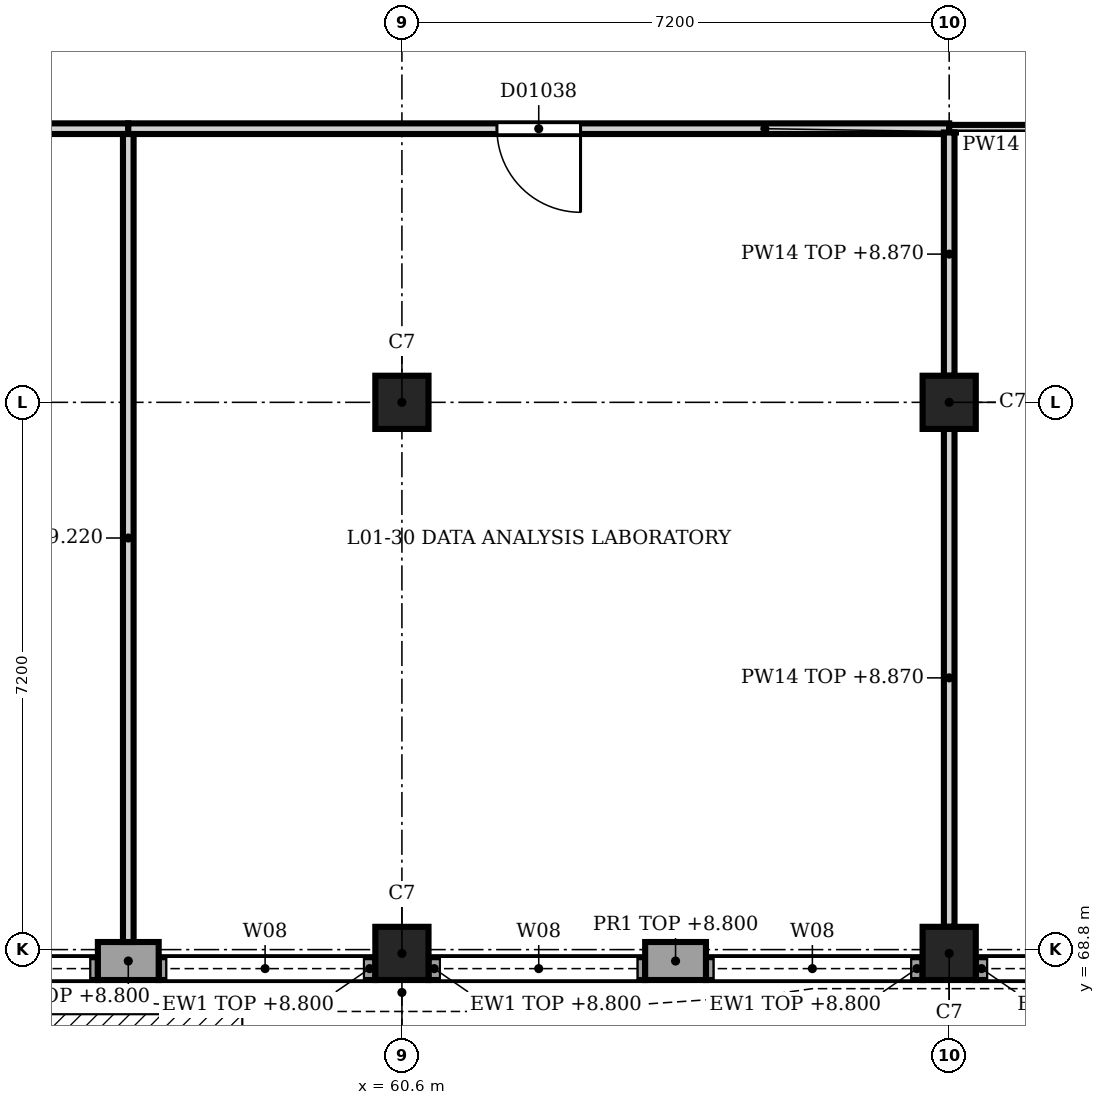
"""IFC4 building model, lengths in metres.
Left out: names, types, materials, properties, quantities, classifications, styles, units other than length and angle.
Written with IfcOpenShell. Run it as: python <this file> out.ifc"""

import sys

from ifc_helpers import new_model, si_unit, direction, frame, frame_2d, origin, origin_2d, place, context, subcontext, project, spatial, rectangle, extrude, element, fill, save


model = new_model("IFC4")
c1 = context("Model", 3, precision=1e-05, world=origin(), true_north=direction((0.0, 1.0)))
c2 = subcontext(c1, "Body", "Model", "MODEL_VIEW")
j1 = project(units=[si_unit("LENGTHUNIT", "METRE"), si_unit("PLANEANGLEUNIT", "RADIAN")], contexts=[c1])
p1 = place(None, origin())
s1 = spatial("IfcSite", under=j1, at=p1, CompositionType="ELEMENT")
p2 = place(p1, origin())
s2 = spatial("IfcBuilding", under=s1, at=p2, CompositionType="ELEMENT")
p3 = place(p2, frame((0.0, 0.0, 5.4)))
s3 = spatial("IfcBuildingStorey", under=s2, at=p3, CompositionType="ELEMENT", Elevation=5.4)
for number, where, z_axis, x_axis in (
    (1, (60.6, 68.75, 0.0), (0.0, 0.0, 1.0), (1.0, 0.0, 0.0)),
    (2, (60.6, 76.0, 0.0), (0.0, 0.0, 1.0), (1.0, 0.0, 0.0)),
    (3, (67.8, 68.75, 0.0), (0.0, 0.0, 1.0), (1.0, 0.0, 0.0)),
    (4, (67.8, 76.0, 0.0), (0.0, 0.0, 1.0), (1.0, 0.0, 0.0)),
):
    element("IfcColumn", number, at=place(p3, frame(where, z_axis=z_axis, x_axis=x_axis)), inside=s3, PredefinedType="COLUMN", context=c2, shape_type="SweptSolid", body=[
        extrude(rectangle(XDim=0.7, YDim=0.7, at=origin_2d()), origin(), (0.0, 0.0, 1.0), 4.5),
    ])
p4 = place(p3, frame((64.6, 68.65, 0.0), z_axis=(0.0, 0.0, 1.0), x_axis=(-1.0, 0.0, 0.0)))
e5 = element("IfcWall", 5, at=p4, inside=s3, PredefinedType="SOLIDWALL", context=c2, shape_type="SweptSolid", body=[
    extrude(rectangle(XDim=0.8, YDim=0.5, at=frame_2d((0.4, 0.0))), origin(), (0.0, 0.0, 1.0), 3.4),
])
p5 = place(p3, frame((57.4, 68.65, 0.0), z_axis=(0.0, 0.0, 1.0), x_axis=(-1.0, 0.0, 0.0)))
e6 = element("IfcWall", 6, at=p5, inside=s3, PredefinedType="SOLIDWALL", context=c2, shape_type="SweptSolid", body=[
    extrude(rectangle(XDim=0.8, YDim=0.5, at=frame_2d((0.4, 0.0))), origin(), (0.0, 0.0, 1.0), 3.4),
])
p6 = place(p3, frame((71.0, 68.55, 0.0), z_axis=(0.0, 0.0, 1.0), x_axis=(-1.0, 0.0, 0.0)))
e7 = element("IfcWall", 7, at=p6, inside=s3, PredefinedType="SOLIDWALL", context=c2, shape_type="SweptSolid", body=[
    extrude(rectangle(XDim=2.85, YDim=0.3, at=frame_2d((1.425, 0.0))), origin(), (0.0, 0.0, 1.0), 3.4),
])
p7 = place(p6, frame((0.1, 0.0, 1.2)))
e8 = element("IfcOpeningElement", 8, at=p7, cuts=e7, PredefinedType="OPENING", context=c2, shape_type="SweptSolid", body=[
    extrude(rectangle(XDim=2.6, YDim=2.1, at=frame_2d((1.3, 1.05))), frame((0.0, 0.16, 0.0), z_axis=(0.0, -1.0, 0.0), x_axis=(1.0, 0.0, 0.0)), (0.0, 0.0, 1.0), 0.32),
])
p8 = place(p3, frame((67.45, 68.55, 0.0), z_axis=(0.0, 0.0, 1.0), x_axis=(-1.0, 0.0, 0.0)))
e9 = element("IfcWall", 9, at=p8, inside=s3, PredefinedType="SOLIDWALL", context=c2, shape_type="SweptSolid", body=[
    extrude(rectangle(XDim=2.85, YDim=0.3, at=frame_2d((1.425, 0.0))), origin(), (0.0, 0.0, 1.0), 3.4),
])
p9 = place(p8, frame((0.15, 0.0, 1.2)))
e10 = element("IfcOpeningElement", 10, at=p9, cuts=e9, PredefinedType="OPENING", context=c2, shape_type="SweptSolid", body=[
    extrude(rectangle(XDim=2.6, YDim=2.1, at=frame_2d((1.3, 1.05))), frame((0.0, 0.16, 0.0), z_axis=(0.0, -1.0, 0.0), x_axis=(1.0, 0.0, 0.0)), (0.0, 0.0, 1.0), 0.32),
])
p10 = place(p3, frame((63.8, 68.55, 0.0), z_axis=(0.0, 0.0, 1.0), x_axis=(-1.0, 0.0, 0.0)))
e11 = element("IfcWall", 11, at=p10, inside=s3, PredefinedType="SOLIDWALL", context=c2, shape_type="SweptSolid", body=[
    extrude(rectangle(XDim=2.85, YDim=0.3, at=frame_2d((1.425, 0.0))), origin(), (0.0, 0.0, 1.0), 3.4),
])
p11 = place(p10, frame((0.1, 0.0, 1.2)))
e12 = element("IfcOpeningElement", 12, at=p11, cuts=e11, PredefinedType="OPENING", context=c2, shape_type="SweptSolid", body=[
    extrude(rectangle(XDim=2.6, YDim=2.1, at=frame_2d((1.3, 1.05))), frame((0.0, 0.16, 0.0), z_axis=(0.0, -1.0, 0.0), x_axis=(1.0, 0.0, 0.0)), (0.0, 0.0, 1.0), 0.32),
])
p12 = place(p3, frame((60.25, 68.55, 0.0), z_axis=(0.0, 0.0, 1.0), x_axis=(-1.0, 0.0, 0.0)))
e13 = element("IfcWall", 13, at=p12, inside=s3, PredefinedType="SOLIDWALL", context=c2, shape_type="SweptSolid", body=[
    extrude(rectangle(XDim=2.85, YDim=0.3, at=frame_2d((1.425, 0.0))), origin(), (0.0, 0.0, 1.0), 3.4),
])
p13 = place(p12, frame((0.15, 0.0, 1.2)))
e14 = element("IfcOpeningElement", 14, at=p13, cuts=e13, PredefinedType="OPENING", context=c2, shape_type="SweptSolid", body=[
    extrude(rectangle(XDim=2.6, YDim=2.1, at=frame_2d((1.3, 1.05))), frame((0.0, 0.16, 0.0), z_axis=(0.0, -1.0, 0.0), x_axis=(1.0, 0.0, 0.0)), (0.0, 0.0, 1.0), 0.32),
])
p14 = place(p3, frame((56.6, 68.55, 0.0), z_axis=(0.0, 0.0, 1.0), x_axis=(-1.0, 0.0, 0.0)))
e15 = element("IfcWall", 15, at=p14, inside=s3, PredefinedType="SOLIDWALL", context=c2, shape_type="SweptSolid", body=[
    extrude(rectangle(XDim=2.85, YDim=0.3, at=frame_2d((1.425, 0.0))), origin(), (0.0, 0.0, 1.0), 3.4),
])
p15 = place(p14, frame((0.1, 0.0, 1.2)))
e16 = element("IfcOpeningElement", 16, at=p15, cuts=e15, PredefinedType="OPENING", context=c2, shape_type="SweptSolid", body=[
    extrude(rectangle(XDim=2.6, YDim=2.1, at=frame_2d((1.3, 1.05))), frame((0.0, 0.16, 0.0), z_axis=(0.0, -1.0, 0.0), x_axis=(1.0, 0.0, 0.0)), (0.0, 0.0, 1.0), 0.32),
])
p16 = place(p3, frame((57.0, 79.6, 0.0), z_axis=(0.0, 0.0, 1.0), x_axis=(-1.0, 0.0, 0.0)))
e17 = element("IfcWall", 17, at=p16, inside=s3, PredefinedType="PARTITIONING", context=c2, shape_type="SweptSolid", body=[
    extrude(rectangle(XDim=18.0, YDim=0.14, at=frame_2d((9.0, 0.0))), origin(), (0.0, 0.0, 1.0), 4.3),
])
p17 = place(p16, frame((8.45, 0.0, 0.0)))
e18 = element("IfcOpeningElement", 18, at=p17, cuts=e17, PredefinedType="OPENING", context=c2, shape_type="SweptSolid", body=[
    extrude(rectangle(XDim=1.1, YDim=2.2, at=frame_2d((0.55, 1.1))), frame((0.0, 0.08, 0.0), z_axis=(0.0, -1.0, 0.0), x_axis=(1.0, 0.0, 0.0)), (0.0, 0.0, 1.0), 0.16),
])
p18 = place(p3, frame((67.8, 79.6, 0.0), z_axis=(0.0, 0.0, 1.0), x_axis=(-1.0, 0.0, 0.0)))
e19 = element("IfcWall", 19, at=p18, inside=s3, PredefinedType="PARTITIONING", context=c2, shape_type="SweptSolid", body=[
    extrude(rectangle(XDim=10.8, YDim=0.14, at=frame_2d((5.4, 0.0))), origin(), (0.0, 0.0, 1.0), 4.3),
])
p19 = place(p18, frame((4.85, 0.0, 0.0)))
e20 = element("IfcOpeningElement", 20, at=p19, cuts=e19, PredefinedType="OPENING", context=c2, shape_type="SweptSolid", body=[
    extrude(rectangle(XDim=1.1, YDim=2.2, at=frame_2d((0.55, 1.1))), frame((0.0, 0.08, 0.0), z_axis=(0.0, -1.0, 0.0), x_axis=(1.0, 0.0, 0.0)), (0.0, 0.0, 1.0), 0.16),
])
p20 = place(p3, frame((82.2, 79.6, 0.0), z_axis=(0.0, 0.0, 1.0), x_axis=(-1.0, 0.0, 0.0)))
e21 = element("IfcWall", 21, at=p20, inside=s3, PredefinedType="PARTITIONING", context=c2, shape_type="SweptSolid", body=[
    extrude(rectangle(XDim=14.4, YDim=0.1, at=frame_2d((7.2, 0.0))), origin(), (0.0, 0.0, 1.0), 4.3),
])
p21 = place(p20, frame((6.65, 0.0, 0.0)))
e22 = element("IfcOpeningElement", 22, at=p21, cuts=e21, PredefinedType="OPENING", context=c2, shape_type="SweptSolid", body=[
    extrude(rectangle(XDim=1.0, YDim=2.1, at=frame_2d((0.5, 1.05))), frame((0.0, 0.06, 0.0), z_axis=(0.0, -1.0, 0.0), x_axis=(1.0, 0.0, 0.0)), (0.0, 0.0, 1.0), 0.12),
])
p22 = place(p3, frame((57.0, 68.9, 0.0), z_axis=(0.0, 0.0, 1.0), x_axis=(0.0, 1.0, 0.0)))
e23 = element("IfcWall", 23, at=p22, inside=s3, PredefinedType="PARTITIONING", context=c2, shape_type="SweptSolid", body=[
    extrude(rectangle(XDim=10.63, YDim=0.14, at=frame_2d((5.315, 0.0))), origin(), (0.0, 0.0, 1.0), 3.82),
])
p23 = place(p3, frame((67.8, 69.1, 0.0), z_axis=(0.0, 0.0, 1.0), x_axis=(0.0, 1.0, 0.0)))
e24 = element("IfcWall", 24, at=p23, inside=s3, PredefinedType="PARTITIONING", context=c2, shape_type="SweptSolid", body=[
    extrude(rectangle(XDim=6.55, YDim=0.14, at=frame_2d((3.275, 0.0))), origin(), (0.0, 0.0, 1.0), 3.47),
])
p24 = place(p3, frame((67.8, 76.35, 0.0), z_axis=(0.0, 0.0, 1.0), x_axis=(0.0, 1.0, 0.0)))
e25 = element("IfcWall", 25, at=p24, inside=s3, PredefinedType="PARTITIONING", context=c2, shape_type="SweptSolid", body=[
    extrude(rectangle(XDim=3.2, YDim=0.14, at=frame_2d((1.6, 0.0))), origin(), (0.0, 0.0, 1.0), 3.47),
])
p25 = place(p7, origin())
e26 = element("IfcWindow", 26, at=p25, inside=s3, PartitioningType="SINGLE_PANEL", PredefinedType="WINDOW", context=c2, shape_type="SweptSolid", body=[
    extrude(rectangle(XDim=2.6, YDim=2.1, at=frame_2d((1.3, 1.05))), frame((0.0, 0.03, 0.0), z_axis=(0.0, -1.0, 0.0), x_axis=(1.0, 0.0, 0.0)), (0.0, 0.0, 1.0), 0.06),
])
fill(e8, e26)
p26 = place(p9, origin())
e27 = element("IfcWindow", 27, at=p26, inside=s3, PartitioningType="SINGLE_PANEL", PredefinedType="WINDOW", context=c2, shape_type="SweptSolid", body=[
    extrude(rectangle(XDim=2.6, YDim=2.1, at=frame_2d((1.3, 1.05))), frame((0.0, 0.03, 0.0), z_axis=(0.0, -1.0, 0.0), x_axis=(1.0, 0.0, 0.0)), (0.0, 0.0, 1.0), 0.06),
])
fill(e10, e27)
p27 = place(p11, origin())
e28 = element("IfcWindow", 28, at=p27, inside=s3, PartitioningType="SINGLE_PANEL", PredefinedType="WINDOW", context=c2, shape_type="SweptSolid", body=[
    extrude(rectangle(XDim=2.6, YDim=2.1, at=frame_2d((1.3, 1.05))), frame((0.0, 0.03, 0.0), z_axis=(0.0, -1.0, 0.0), x_axis=(1.0, 0.0, 0.0)), (0.0, 0.0, 1.0), 0.06),
])
fill(e12, e28)
p28 = place(p13, origin())
e29 = element("IfcWindow", 29, at=p28, inside=s3, PartitioningType="SINGLE_PANEL", PredefinedType="WINDOW", context=c2, shape_type="SweptSolid", body=[
    extrude(rectangle(XDim=2.6, YDim=2.1, at=frame_2d((1.3, 1.05))), frame((0.0, 0.03, 0.0), z_axis=(0.0, -1.0, 0.0), x_axis=(1.0, 0.0, 0.0)), (0.0, 0.0, 1.0), 0.06),
])
fill(e14, e29)
p29 = place(p15, origin())
e30 = element("IfcWindow", 30, at=p29, inside=s3, PartitioningType="SINGLE_PANEL", PredefinedType="WINDOW", context=c2, shape_type="SweptSolid", body=[
    extrude(rectangle(XDim=2.6, YDim=2.1, at=frame_2d((1.3, 1.05))), frame((0.0, 0.03, 0.0), z_axis=(0.0, -1.0, 0.0), x_axis=(1.0, 0.0, 0.0)), (0.0, 0.0, 1.0), 0.06),
])
fill(e16, e30)
p30 = place(p19, origin())
e31 = element("IfcDoor", 31, at=p30, inside=s3, OperationType="SINGLE_SWING_RIGHT", PredefinedType="DOOR", context=c2, shape_type="SweptSolid", body=[
    extrude(rectangle(XDim=1.1, YDim=2.2, at=frame_2d((0.55, 1.1))), frame((0.0, 0.025, 0.0), z_axis=(0.0, -1.0, 0.0), x_axis=(1.0, 0.0, 0.0)), (0.0, 0.0, 1.0), 0.05),
])
fill(e20, e31)
save(model, sys.argv[1])
